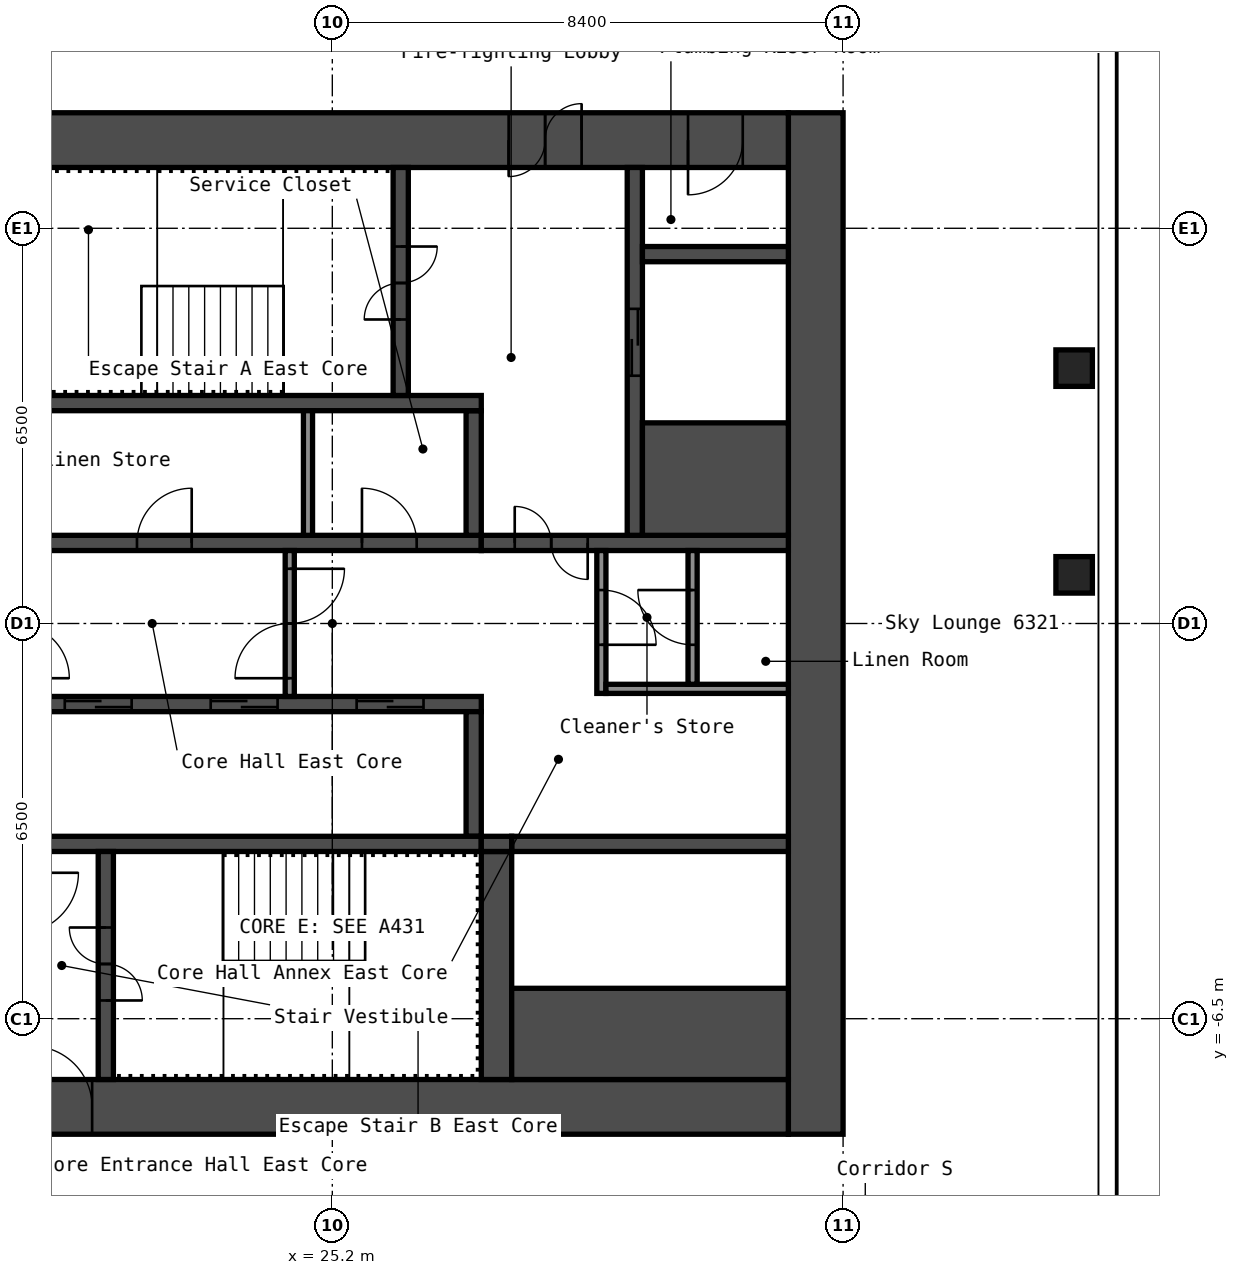
"""IFC4 building model, lengths in metres.
Left out: names, types, materials, properties, quantities, classifications, styles, units other than length and angle.
Written with IfcOpenShell. Run it as: python <this file> out.ifc"""

import sys

from ifc_helpers import new_model, si_unit, direction, frame, frame_2d, origin, origin_2d, place, context, subcontext, project, spatial, rectangle, hollow_rectangle, extrude, element, fill, save


model = new_model("IFC4")
c1 = context("Model", 3, precision=1e-05, world=origin(), true_north=direction((0.0, 1.0)))
c2 = subcontext(c1, "Body", "Model", "MODEL_VIEW")
j1 = project(units=[si_unit("LENGTHUNIT", "METRE"), si_unit("PLANEANGLEUNIT", "RADIAN")], contexts=[c1])
p1 = place(None, origin())
s1 = spatial("IfcSite", under=j1, at=p1, CompositionType="ELEMENT")
p2 = place(p1, origin())
s2 = spatial("IfcBuilding", under=s1, at=p2, CompositionType="ELEMENT")
p3 = place(p2, frame((0.0, 0.0, 221.8)))
s3 = spatial("IfcBuildingStorey", under=s2, at=p3, CompositionType="ELEMENT", Elevation=221.8)
for number, where, z_axis, x_axis in (
    (1, (37.4, 0.8, 0.0), (0.0, 0.0, 1.0), (1.0, 0.0, 0.0)),
    (2, (37.4, 4.2, 0.0), (0.0, 0.0, 1.0), (1.0, 0.0, 0.0)),
):
    element("IfcColumn", number, at=place(p3, frame(where, z_axis=z_axis, x_axis=x_axis)), inside=s3, PredefinedType="COLUMN", context=c2, shape_type="SweptSolid", body=[
        extrude(hollow_rectangle(XDim=0.6, YDim=0.6, WallThickness=0.025, InnerFilletRadius=0.038, OuterFilletRadius=0.062, at=origin_2d()), origin(), (0.0, 0.0, 1.0), 2.75),
    ])
p4 = place(p3, frame((33.15, -8.4, 0.0), z_axis=(0.0, 0.0, 1.0), x_axis=(0.0, 1.0, 0.0)))
e3 = element("IfcWall", 3, at=p4, inside=s3, PredefinedType="SHEAR", context=c2, shape_type="SweptSolid", body=[
    extrude(rectangle(XDim=16.8, YDim=0.9, at=frame_2d((8.4, 0.0))), origin(), (0.0, 0.0, 1.0), 2.75),
])
p5 = place(p3, frame((17.7, 7.95, 0.0), z_axis=(0.0, 0.0, 1.0), x_axis=(1.0, 0.0, 0.0)))
e4 = element("IfcWall", 4, at=p5, inside=s3, PredefinedType="SHEAR", context=c2, shape_type="SweptSolid", body=[
    extrude(rectangle(XDim=15.0, YDim=0.9, at=frame_2d((7.5, 0.0))), origin(), (0.0, 0.0, 1.0), 2.75),
])
p6 = place(p5, frame((10.4, 0.0, 0.0)))
e5 = element("IfcOpeningElement", 5, at=p6, cuts=e4, PredefinedType="OPENING", context=c2, shape_type="SweptSolid", body=[
    extrude(rectangle(XDim=1.2, YDim=2.1, at=frame_2d((0.6, 1.05))), frame((0.0, 0.46, 0.0), z_axis=(0.0, -1.0, 0.0), x_axis=(1.0, 0.0, 0.0)), (0.0, 0.0, 1.0), 0.92),
])
p7 = place(p5, frame((13.35, 0.0, 0.0)))
e6 = element("IfcOpeningElement", 6, at=p7, cuts=e4, PredefinedType="OPENING", context=c2, shape_type="SweptSolid", body=[
    extrude(rectangle(XDim=0.9, YDim=2.1, at=frame_2d((0.45, 1.05))), frame((0.0, 0.46, 0.0), z_axis=(0.0, -1.0, 0.0), x_axis=(1.0, 0.0, 0.0)), (0.0, 0.0, 1.0), 0.92),
])
p8 = place(p3, frame((17.7, -7.95, 0.0), z_axis=(0.0, 0.0, 1.0), x_axis=(1.0, 0.0, 0.0)))
e7 = element("IfcWall", 7, at=p8, inside=s3, PredefinedType="SHEAR", context=c2, shape_type="SweptSolid", body=[
    extrude(rectangle(XDim=15.0, YDim=0.9, at=frame_2d((7.5, 0.0))), origin(), (0.0, 0.0, 1.0), 2.75),
])
p9 = place(p8, frame((2.55, 0.0, 0.0)))
e8 = element("IfcOpeningElement", 8, at=p9, cuts=e7, PredefinedType="OPENING", context=c2, shape_type="SweptSolid", body=[
    extrude(rectangle(XDim=1.0, YDim=2.1, at=frame_2d((0.5, 1.05))), frame((0.0, 0.46, 0.0), z_axis=(0.0, -1.0, 0.0), x_axis=(1.0, 0.0, 0.0)), (0.0, 0.0, 1.0), 0.92),
])
p10 = place(p3, frame((20.15, 1.325, 0.0), z_axis=(0.0, 0.0, 1.0), x_axis=(1.0, 0.0, 0.0)))
e9 = element("IfcWall", 9, at=p10, inside=s3, PredefinedType="SHEAR", context=c2, shape_type="SweptSolid", body=[
    extrude(rectangle(XDim=7.5, YDim=0.25, at=frame_2d((3.75, 0.0))), origin(), (0.0, 0.0, 1.0), 2.75),
])
p11 = place(p10, frame((1.837, 0.0, 0.0)))
e10 = element("IfcOpeningElement", 10, at=p11, cuts=e9, PredefinedType="OPENING", context=c2, shape_type="SweptSolid", body=[
    extrude(rectangle(XDim=0.9, YDim=2.1, at=frame_2d((0.45, 1.05))), frame((0.0, 0.135, 0.0), z_axis=(0.0, -1.0, 0.0), x_axis=(1.0, 0.0, 0.0)), (0.0, 0.0, 1.0), 0.27),
])
p12 = place(p10, frame((5.538, 0.0, 0.0)))
e11 = element("IfcOpeningElement", 11, at=p12, cuts=e9, PredefinedType="OPENING", context=c2, shape_type="SweptSolid", body=[
    extrude(rectangle(XDim=0.9, YDim=2.1, at=frame_2d((0.45, 1.05))), frame((0.0, 0.135, 0.0), z_axis=(0.0, -1.0, 0.0), x_axis=(1.0, 0.0, 0.0)), (0.0, 0.0, 1.0), 0.27),
])
p13 = place(p3, frame((27.525, 1.45, 0.0), z_axis=(0.0, 0.0, 1.0), x_axis=(0.0, 1.0, 0.0)))
e12 = element("IfcWall", 12, at=p13, inside=s3, PredefinedType="SHEAR", context=c2, shape_type="SweptSolid", body=[
    extrude(rectangle(XDim=2.05, YDim=0.25, at=frame_2d((1.025, 0.0))), origin(), (0.0, 0.0, 1.0), 2.75),
])
p14 = place(p3, frame((20.15, 3.625, 0.0), z_axis=(0.0, 0.0, 1.0), x_axis=(1.0, 0.0, 0.0)))
e13 = element("IfcWall", 13, at=p14, inside=s3, PredefinedType="SHEAR", context=c2, shape_type="SweptSolid", body=[
    extrude(rectangle(XDim=7.5, YDim=0.25, at=frame_2d((3.75, 0.0))), origin(), (0.0, 0.0, 1.0), 2.75),
])
p15 = place(p3, frame((26.325, 3.75, 0.0), z_axis=(0.0, 0.0, 1.0), x_axis=(0.0, 1.0, 0.0)))
e14 = element("IfcWall", 14, at=p15, inside=s3, PredefinedType="SHEAR", context=c2, shape_type="SweptSolid", body=[
    extrude(rectangle(XDim=3.75, YDim=0.25, at=frame_2d((1.875, 0.0))), origin(), (0.0, 0.0, 1.0), 2.75),
])
p16 = place(p15, frame((1.25, 0.0, 0.0)))
e15 = element("IfcOpeningElement", 15, at=p16, cuts=e14, PredefinedType="OPENING", context=c2, shape_type="SweptSolid", body=[
    extrude(rectangle(XDim=1.2, YDim=2.1, at=frame_2d((0.6, 1.05))), frame((0.0, 0.135, 0.0), z_axis=(0.0, -1.0, 0.0), x_axis=(1.0, 0.0, 0.0)), (0.0, 0.0, 1.0), 0.27),
])
p17 = place(p3, frame((27.65, 1.325, 0.0), z_axis=(0.0, 0.0, 1.0), x_axis=(1.0, 0.0, 0.0)))
e16 = element("IfcWall", 16, at=p17, inside=s3, PredefinedType="SHEAR", context=c2, shape_type="SweptSolid", body=[
    extrude(rectangle(XDim=5.05, YDim=0.25, at=frame_2d((2.525, 0.0))), origin(), (0.0, 0.0, 1.0), 2.75),
])
p18 = place(p17, frame((0.55, 0.0, 0.0)))
e17 = element("IfcOpeningElement", 17, at=p18, cuts=e16, PredefinedType="OPENING", context=c2, shape_type="SweptSolid", body=[
    extrude(rectangle(XDim=1.2, YDim=2.1, at=frame_2d((0.6, 1.05))), frame((0.0, 0.135, 0.0), z_axis=(0.0, -1.0, 0.0), x_axis=(1.0, 0.0, 0.0)), (0.0, 0.0, 1.0), 0.27),
])
p19 = place(p3, frame((30.175, 1.45, 0.0), z_axis=(0.0, 0.0, 1.0), x_axis=(0.0, 1.0, 0.0)))
e18 = element("IfcWall", 18, at=p19, inside=s3, PredefinedType="SHEAR", context=c2, shape_type="SweptSolid", body=[
    extrude(rectangle(XDim=6.05, YDim=0.25, at=frame_2d((3.025, 0.0))), origin(), (0.0, 0.0, 1.0), 2.75),
])
p20 = place(p19, frame((2.625, 0.0, 0.0)))
e19 = element("IfcOpeningElement", 19, at=p20, cuts=e18, PredefinedType="OPENING", context=c2, shape_type="SweptSolid", body=[
    extrude(rectangle(XDim=1.1, YDim=2.1, at=frame_2d((0.55, 1.05))), frame((0.0, 0.135, 0.0), z_axis=(0.0, -1.0, 0.0), x_axis=(1.0, 0.0, 0.0)), (0.0, 0.0, 1.0), 0.27),
])
p21 = place(p3, frame((30.3, 2.375, 0.0), z_axis=(0.0, 0.0, 1.0), x_axis=(1.0, 0.0, 0.0)))
e20 = element("IfcWall", 20, at=p21, inside=s3, PredefinedType="SHEAR", context=c2, shape_type="SweptSolid", body=[
    extrude(rectangle(XDim=2.4, YDim=1.85, at=frame_2d((1.2, 0.0))), origin(), (0.0, 0.0, 1.0), 2.75),
])
p22 = place(p3, frame((30.3, 6.075, 0.0), z_axis=(0.0, 0.0, 1.0), x_axis=(1.0, 0.0, 0.0)))
e21 = element("IfcWall", 21, at=p22, inside=s3, PredefinedType="SHEAR", context=c2, shape_type="SweptSolid", body=[
    extrude(rectangle(XDim=2.4, YDim=0.25, at=frame_2d((1.2, 0.0))), origin(), (0.0, 0.0, 1.0), 2.75),
])
p23 = place(p3, frame((20.15, -1.325, 0.0), z_axis=(0.0, 0.0, 1.0), x_axis=(1.0, 0.0, 0.0)))
e22 = element("IfcWall", 22, at=p23, inside=s3, PredefinedType="SHEAR", context=c2, shape_type="SweptSolid", body=[
    extrude(rectangle(XDim=7.5, YDim=0.25, at=frame_2d((3.75, 0.0))), origin(), (0.0, 0.0, 1.0), 2.75),
])
p24 = place(p23, frame((0.65, 0.0, 0.0)))
e23 = element("IfcOpeningElement", 23, at=p24, cuts=e22, PredefinedType="OPENING", context=c2, shape_type="SweptSolid", body=[
    extrude(rectangle(XDim=1.1, YDim=2.1, at=frame_2d((0.55, 1.05))), frame((0.0, 0.135, 0.0), z_axis=(0.0, -1.0, 0.0), x_axis=(1.0, 0.0, 0.0)), (0.0, 0.0, 1.0), 0.27),
])
p25 = place(p23, frame((3.05, 0.0, 0.0)))
e24 = element("IfcOpeningElement", 24, at=p25, cuts=e22, PredefinedType="OPENING", context=c2, shape_type="SweptSolid", body=[
    extrude(rectangle(XDim=1.1, YDim=2.1, at=frame_2d((0.55, 1.05))), frame((0.0, 0.135, 0.0), z_axis=(0.0, -1.0, 0.0), x_axis=(1.0, 0.0, 0.0)), (0.0, 0.0, 1.0), 0.27),
])
p26 = place(p23, frame((5.45, 0.0, 0.0)))
e25 = element("IfcOpeningElement", 25, at=p26, cuts=e22, PredefinedType="OPENING", context=c2, shape_type="SweptSolid", body=[
    extrude(rectangle(XDim=1.1, YDim=2.1, at=frame_2d((0.55, 1.05))), frame((0.0, 0.135, 0.0), z_axis=(0.0, -1.0, 0.0), x_axis=(1.0, 0.0, 0.0)), (0.0, 0.0, 1.0), 0.27),
])
p27 = place(p3, frame((27.525, -3.5, 0.0), z_axis=(0.0, 0.0, 1.0), x_axis=(0.0, 1.0, 0.0)))
e26 = element("IfcWall", 26, at=p27, inside=s3, PredefinedType="SHEAR", context=c2, shape_type="SweptSolid", body=[
    extrude(rectangle(XDim=2.05, YDim=0.25, at=frame_2d((1.025, 0.0))), origin(), (0.0, 0.0, 1.0), 2.75),
])
p28 = place(p3, frame((20.15, -3.625, 0.0), z_axis=(0.0, 0.0, 1.0), x_axis=(1.0, 0.0, 0.0)))
e27 = element("IfcWall", 27, at=p28, inside=s3, PredefinedType="SHEAR", context=c2, shape_type="SweptSolid", body=[
    extrude(rectangle(XDim=7.5, YDim=0.25, at=frame_2d((3.75, 0.0))), origin(), (0.0, 0.0, 1.0), 2.75),
])
p29 = place(p3, frame((21.475, -7.5, 0.0), z_axis=(0.0, 0.0, 1.0), x_axis=(0.0, 1.0, 0.0)))
e28 = element("IfcWall", 28, at=p29, inside=s3, PredefinedType="SHEAR", context=c2, shape_type="SweptSolid", body=[
    extrude(rectangle(XDim=3.75, YDim=0.25, at=frame_2d((1.875, 0.0))), origin(), (0.0, 0.0, 1.0), 2.75),
])
p30 = place(p29, frame((1.3, 0.0, 0.0)))
e29 = element("IfcOpeningElement", 29, at=p30, cuts=e28, PredefinedType="OPENING", context=c2, shape_type="SweptSolid", body=[
    extrude(rectangle(XDim=1.2, YDim=2.1, at=frame_2d((0.6, 1.05))), frame((0.0, 0.135, 0.0), z_axis=(0.0, -1.0, 0.0), x_axis=(1.0, 0.0, 0.0)), (0.0, 0.0, 1.0), 0.27),
])
p31 = place(p3, frame((27.9, -7.5, 0.0), z_axis=(0.0, 0.0, 1.0), x_axis=(0.0, 1.0, 0.0)))
e30 = element("IfcWall", 30, at=p31, inside=s3, PredefinedType="SHEAR", context=c2, shape_type="SweptSolid", body=[
    extrude(rectangle(XDim=3.75, YDim=0.5, at=frame_2d((1.875, 0.0))), origin(), (0.0, 0.0, 1.0), 2.75),
])
p32 = place(p3, frame((28.15, -3.625, 0.0), z_axis=(0.0, 0.0, 1.0), x_axis=(1.0, 0.0, 0.0)))
e31 = element("IfcWall", 31, at=p32, inside=s3, PredefinedType="SHEAR", context=c2, shape_type="SweptSolid", body=[
    extrude(rectangle(XDim=4.55, YDim=0.25, at=frame_2d((2.275, 0.0))), origin(), (0.0, 0.0, 1.0), 2.75),
])
p33 = place(p3, frame((28.15, -6.75, 0.0), z_axis=(0.0, 0.0, 1.0), x_axis=(1.0, 0.0, 0.0)))
e32 = element("IfcWall", 32, at=p33, inside=s3, PredefinedType="SHEAR", context=c2, shape_type="SweptSolid", body=[
    extrude(rectangle(XDim=4.55, YDim=1.5, at=frame_2d((2.275, 0.0))), origin(), (0.0, 0.0, 1.0), 2.75),
])
p34 = place(p3, frame((27.65, -3.625, 0.0), z_axis=(0.0, 0.0, 1.0), x_axis=(1.0, 0.0, 0.0)))
e33 = element("IfcWall", 33, at=p34, inside=s3, PredefinedType="SHEAR", context=c2, shape_type="SweptSolid", body=[
    extrude(rectangle(XDim=0.5, YDim=0.25, at=frame_2d((0.25, 0.0))), origin(), (0.0, 0.0, 1.0), 2.75),
])
p35 = place(p3, frame((24.5, -1.2, 0.0), z_axis=(0.0, 0.0, 1.0), x_axis=(0.0, 1.0, 0.0)))
e34 = element("IfcWall", 34, at=p35, inside=s3, PredefinedType="PARTITIONING", context=c2, shape_type="SweptSolid", body=[
    extrude(rectangle(XDim=2.4, YDim=0.15, at=frame_2d((1.2, 0.0))), origin(), (0.0, 0.0, 1.0), 2.75),
])
p36 = place(p35, frame((0.3, 0.0, 0.0)))
e35 = element("IfcOpeningElement", 35, at=p36, cuts=e34, PredefinedType="OPENING", context=c2, shape_type="SweptSolid", body=[
    extrude(rectangle(XDim=1.8, YDim=2.1, at=frame_2d((0.9, 1.05))), frame((0.0, 0.085, 0.0), z_axis=(0.0, -1.0, 0.0), x_axis=(1.0, 0.0, 0.0)), (0.0, 0.0, 1.0), 0.17),
])
p37 = place(p3, frame((29.625, -1.15, 0.0), z_axis=(0.0, 0.0, 1.0), x_axis=(0.0, 1.0, 0.0)))
e36 = element("IfcWall", 36, at=p37, inside=s3, PredefinedType="PARTITIONING", context=c2, shape_type="SweptSolid", body=[
    extrude(rectangle(XDim=2.35, YDim=0.15, at=frame_2d((1.175, 0.0))), origin(), (0.0, 0.0, 1.0), 2.75),
])
p38 = place(p37, frame((0.8, 0.0, 0.0)))
e37 = element("IfcOpeningElement", 37, at=p38, cuts=e36, PredefinedType="OPENING", context=c2, shape_type="SweptSolid", body=[
    extrude(rectangle(XDim=0.9, YDim=2.1, at=frame_2d((0.45, 1.05))), frame((0.0, 0.085, 0.0), z_axis=(0.0, -1.0, 0.0), x_axis=(1.0, 0.0, 0.0)), (0.0, 0.0, 1.0), 0.17),
])
p39 = place(p3, frame((29.7, -1.075, 0.0), z_axis=(0.0, 0.0, 1.0), x_axis=(1.0, 0.0, 0.0)))
e38 = element("IfcWall", 38, at=p39, inside=s3, PredefinedType="PARTITIONING", context=c2, shape_type="SweptSolid", body=[
    extrude(rectangle(XDim=3.0, YDim=0.15, at=frame_2d((1.5, 0.0))), origin(), (0.0, 0.0, 1.0), 2.75),
])
p40 = place(p3, frame((31.125, -1.0, 0.0), z_axis=(0.0, 0.0, 1.0), x_axis=(0.0, 1.0, 0.0)))
e39 = element("IfcWall", 39, at=p40, inside=s3, PredefinedType="PARTITIONING", context=c2, shape_type="SweptSolid", body=[
    extrude(rectangle(XDim=2.2, YDim=0.15, at=frame_2d((1.1, 0.0))), origin(), (0.0, 0.0, 1.0), 2.75),
])
p41 = place(p40, frame((0.65, 0.0, 0.0)))
e40 = element("IfcOpeningElement", 40, at=p41, cuts=e39, PredefinedType="OPENING", context=c2, shape_type="SweptSolid", body=[
    extrude(rectangle(XDim=0.9, YDim=2.1, at=frame_2d((0.45, 1.05))), frame((0.0, 0.085, 0.0), z_axis=(0.0, -1.0, 0.0), x_axis=(1.0, 0.0, 0.0)), (0.0, 0.0, 1.0), 0.17),
])
p42 = place(p3, frame((24.8, 1.45, 0.0), z_axis=(0.0, 0.0, 1.0), x_axis=(0.0, 1.0, 0.0)))
e41 = element("IfcWall", 41, at=p42, inside=s3, PredefinedType="PARTITIONING", context=c2, shape_type="SweptSolid", body=[
    extrude(rectangle(XDim=2.05, YDim=0.15, at=frame_2d((1.025, 0.0))), origin(), (0.0, 0.0, 1.0), 2.75),
])
p43 = place(p6, origin())
e42 = element("IfcDoor", 42, at=p43, inside=s3, OperationType="DOUBLE_DOOR_SINGLE_SWING", PredefinedType="DOOR", context=c2, shape_type="SweptSolid", body=[
    extrude(rectangle(XDim=1.2, YDim=2.1, at=frame_2d((0.6, 1.05))), frame((0.0, 0.025, 0.0), z_axis=(0.0, -1.0, 0.0), x_axis=(1.0, 0.0, 0.0)), (0.0, 0.0, 1.0), 0.05),
])
fill(e5, e42)
p44 = place(p7, origin())
e43 = element("IfcDoor", 43, at=p44, inside=s3, OperationType="SINGLE_SWING_LEFT", PredefinedType="DOOR", context=c2, shape_type="SweptSolid", body=[
    extrude(rectangle(XDim=0.9, YDim=2.1, at=frame_2d((0.45, 1.05))), frame((0.0, 0.025, 0.0), z_axis=(0.0, -1.0, 0.0), x_axis=(1.0, 0.0, 0.0)), (0.0, 0.0, 1.0), 0.05),
])
fill(e6, e43)
p45 = place(p9, origin())
e44 = element("IfcDoor", 44, at=p45, inside=s3, OperationType="SINGLE_SWING_RIGHT", PredefinedType="DOOR", context=c2, shape_type="SweptSolid", body=[
    extrude(rectangle(XDim=1.0, YDim=2.1, at=frame_2d((0.5, 1.05))), frame((0.0, 0.025, 0.0), z_axis=(0.0, -1.0, 0.0), x_axis=(1.0, 0.0, 0.0)), (0.0, 0.0, 1.0), 0.05),
])
fill(e8, e44)
p46 = place(p16, origin())
e45 = element("IfcDoor", 45, at=p46, inside=s3, OperationType="DOUBLE_DOOR_SINGLE_SWING", PredefinedType="DOOR", context=c2, shape_type="SweptSolid", body=[
    extrude(rectangle(XDim=1.2, YDim=2.1, at=frame_2d((0.6, 1.05))), frame((0.0, 0.025, 0.0), z_axis=(0.0, -1.0, 0.0), x_axis=(1.0, 0.0, 0.0)), (0.0, 0.0, 1.0), 0.05),
])
fill(e15, e45)
p47 = place(p30, origin())
e46 = element("IfcDoor", 46, at=p47, inside=s3, OperationType="DOUBLE_DOOR_SINGLE_SWING", PredefinedType="DOOR", context=c2, shape_type="SweptSolid", body=[
    extrude(rectangle(XDim=1.2, YDim=2.1, at=frame_2d((0.6, 1.05))), frame((0.0, 0.025, 0.0), z_axis=(0.0, -1.0, 0.0), x_axis=(1.0, 0.0, 0.0)), (0.0, 0.0, 1.0), 0.05),
])
fill(e29, e46)
p48 = place(p18, origin())
e47 = element("IfcDoor", 47, at=p48, inside=s3, OperationType="DOUBLE_DOOR_SINGLE_SWING", PredefinedType="DOOR", context=c2, shape_type="SweptSolid", body=[
    extrude(rectangle(XDim=1.2, YDim=2.1, at=frame_2d((0.6, 1.05))), frame((0.0, 0.025, 0.0), z_axis=(0.0, -1.0, 0.0), x_axis=(1.0, 0.0, 0.0)), (0.0, 0.0, 1.0), 0.05),
])
fill(e17, e47)
p49 = place(p36, origin())
e48 = element("IfcDoor", 48, at=p49, inside=s3, OperationType="DOUBLE_DOOR_SINGLE_SWING", PredefinedType="DOOR", context=c2, shape_type="SweptSolid", body=[
    extrude(rectangle(XDim=1.8, YDim=2.1, at=frame_2d((0.9, 1.05))), frame((0.0, 0.025, 0.0), z_axis=(0.0, -1.0, 0.0), x_axis=(1.0, 0.0, 0.0)), (0.0, 0.0, 1.0), 0.05),
])
fill(e35, e48)
p50 = place(p38, origin())
e49 = element("IfcDoor", 49, at=p50, inside=s3, OperationType="SINGLE_SWING_LEFT", PredefinedType="DOOR", context=c2, shape_type="SweptSolid", body=[
    extrude(rectangle(XDim=0.9, YDim=2.1, at=frame_2d((0.45, 1.05))), frame((0.0, 0.025, 0.0), z_axis=(0.0, -1.0, 0.0), x_axis=(1.0, 0.0, 0.0)), (0.0, 0.0, 1.0), 0.05),
])
fill(e37, e49)
p51 = place(p41, origin())
e50 = element("IfcDoor", 50, at=p51, inside=s3, OperationType="SINGLE_SWING_LEFT", PredefinedType="DOOR", context=c2, shape_type="SweptSolid", body=[
    extrude(rectangle(XDim=0.9, YDim=2.1, at=frame_2d((0.45, 1.05))), frame((0.0, 0.025, 0.0), z_axis=(0.0, -1.0, 0.0), x_axis=(1.0, 0.0, 0.0)), (0.0, 0.0, 1.0), 0.05),
])
fill(e40, e50)
p52 = place(p11, origin())
e51 = element("IfcDoor", 51, at=p52, inside=s3, OperationType="SINGLE_SWING_LEFT", PredefinedType="DOOR", context=c2, shape_type="SweptSolid", body=[
    extrude(rectangle(XDim=0.9, YDim=2.1, at=frame_2d((0.45, 1.05))), frame((0.0, 0.025, 0.0), z_axis=(0.0, -1.0, 0.0), x_axis=(1.0, 0.0, 0.0)), (0.0, 0.0, 1.0), 0.05),
])
fill(e10, e51)
p53 = place(p12, origin())
e52 = element("IfcDoor", 52, at=p53, inside=s3, OperationType="SINGLE_SWING_RIGHT", PredefinedType="DOOR", context=c2, shape_type="SweptSolid", body=[
    extrude(rectangle(XDim=0.9, YDim=2.1, at=frame_2d((0.45, 1.05))), frame((0.0, 0.025, 0.0), z_axis=(0.0, -1.0, 0.0), x_axis=(1.0, 0.0, 0.0)), (0.0, 0.0, 1.0), 0.05),
])
fill(e11, e52)
p54 = place(p24, origin())
e53 = element("IfcDoor", 53, at=p54, inside=s3, OperationType="DOUBLE_DOOR_SLIDING", PredefinedType="DOOR", context=c2, shape_type="SweptSolid", body=[
    extrude(rectangle(XDim=1.1, YDim=2.1, at=frame_2d((0.55, 1.05))), frame((0.0, 0.025, 0.0), z_axis=(0.0, -1.0, 0.0), x_axis=(1.0, 0.0, 0.0)), (0.0, 0.0, 1.0), 0.05),
])
fill(e23, e53)
p55 = place(p25, origin())
e54 = element("IfcDoor", 54, at=p55, inside=s3, OperationType="DOUBLE_DOOR_SLIDING", PredefinedType="DOOR", context=c2, shape_type="SweptSolid", body=[
    extrude(rectangle(XDim=1.1, YDim=2.1, at=frame_2d((0.55, 1.05))), frame((0.0, 0.025, 0.0), z_axis=(0.0, -1.0, 0.0), x_axis=(1.0, 0.0, 0.0)), (0.0, 0.0, 1.0), 0.05),
])
fill(e24, e54)
p56 = place(p26, origin())
e55 = element("IfcDoor", 55, at=p56, inside=s3, OperationType="DOUBLE_DOOR_SLIDING", PredefinedType="DOOR", context=c2, shape_type="SweptSolid", body=[
    extrude(rectangle(XDim=1.1, YDim=2.1, at=frame_2d((0.55, 1.05))), frame((0.0, 0.025, 0.0), z_axis=(0.0, -1.0, 0.0), x_axis=(1.0, 0.0, 0.0)), (0.0, 0.0, 1.0), 0.05),
])
fill(e25, e55)
p57 = place(p20, origin())
e56 = element("IfcDoor", 56, at=p57, inside=s3, OperationType="DOUBLE_DOOR_SLIDING", PredefinedType="DOOR", context=c2, shape_type="SweptSolid", body=[
    extrude(rectangle(XDim=1.1, YDim=2.1, at=frame_2d((0.55, 1.05))), frame((0.0, 0.025, 0.0), z_axis=(0.0, -1.0, 0.0), x_axis=(1.0, 0.0, 0.0)), (0.0, 0.0, 1.0), 0.05),
])
fill(e19, e56)
save(model, sys.argv[1])
